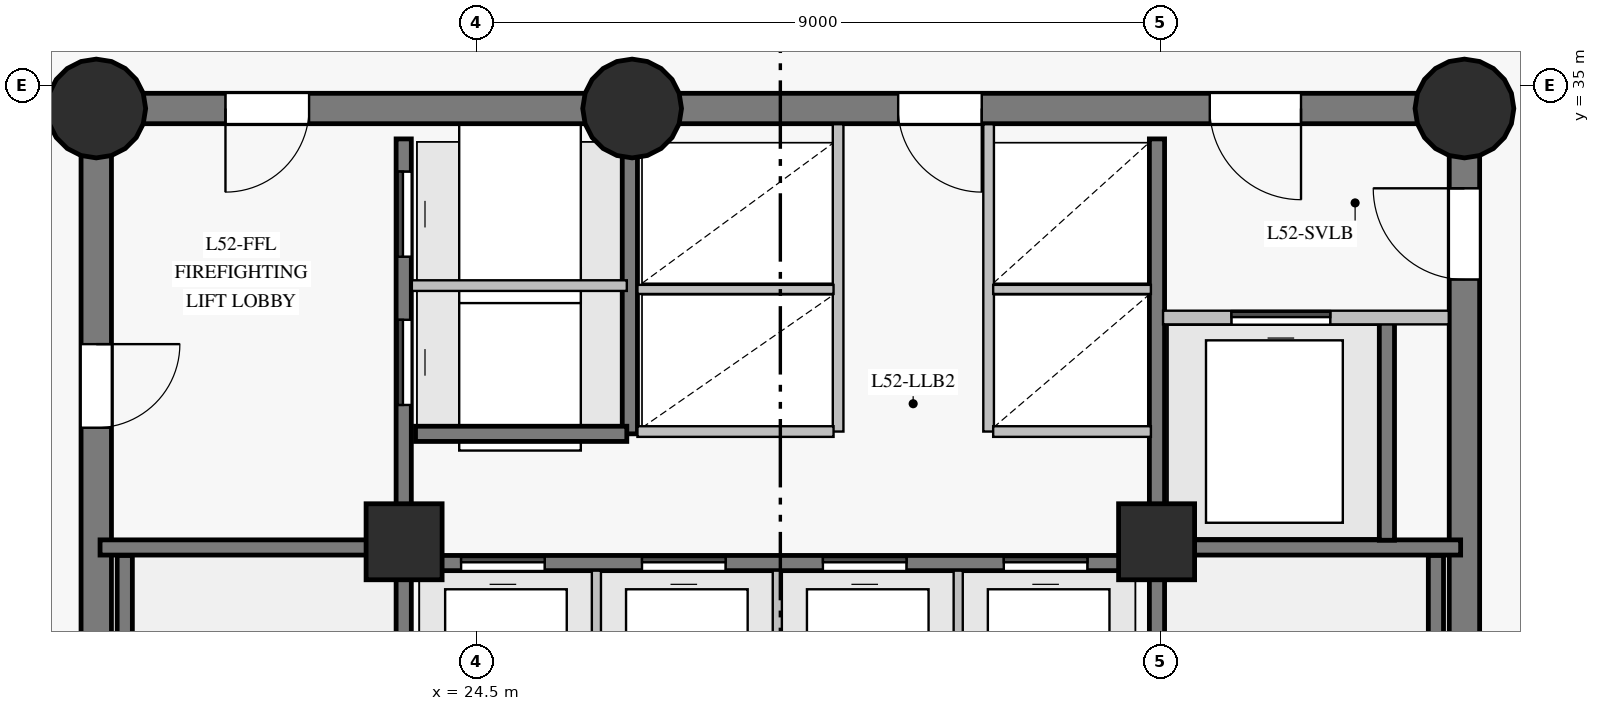
"""IFC4 building model, lengths in metres.
Left out: names, types, materials, properties, quantities, classifications, styles, units other than length and angle.
Written with IfcOpenShell. Run it as: python <this file> out.ifc"""

import sys

from ifc_helpers import new_model, si_unit, direction, frame, frame_2d, origin, origin_with_axes, origin_2d, place, context, subcontext, project, spatial, rectangle, circle, extrude, source, transform, mapped, element, fill, save


model = new_model("IFC4")
c1 = context("Model", 3, precision=1e-05, world=origin(), true_north=direction((0.0, 1.0)))
c2 = subcontext(c1, "Body", "Model", "MODEL_VIEW")
j1 = project(units=[si_unit("LENGTHUNIT", "METRE"), si_unit("PLANEANGLEUNIT", "RADIAN")], contexts=[c1])
p1 = place(None, origin())
s1 = spatial("IfcSite", under=j1, at=p1, CompositionType="ELEMENT")
p2 = place(p1, origin())
s2 = spatial("IfcBuilding", under=s1, at=p2, CompositionType="ELEMENT")
p3 = place(p2, frame((0.0, 0.0, 180.95)))
s3 = spatial("IfcBuildingStorey", under=s2, at=p3, CompositionType="ELEMENT", Elevation=180.95)
p4 = place(p3, frame((37.5, 18.3, 0.0), z_axis=(0.0, 0.0, 1.0), x_axis=(0.0, 1.0, 0.0)))
e1 = element("IfcWall", 1, at=p4, inside=s3, PredefinedType="SHEAR", context=c2, shape_type="SweptSolid", body=[
    extrude(rectangle(XDim=16.4, YDim=0.4, at=frame_2d((8.2, 0.0))), origin(), (0.0, 0.0, 1.0), 2.825),
])
p5 = place(p4, frame((14.15, 0.0, 0.0)))
e2 = element("IfcOpeningElement", 2, at=p5, cuts=e1, PredefinedType="OPENING", context=c2, shape_type="SweptSolid", body=[
    extrude(rectangle(XDim=1.2, YDim=2.15, at=frame_2d((0.6, 1.075))), frame((0.0, 0.21, 0.0), z_axis=(0.0, -1.0, 0.0), x_axis=(1.0, 0.0, 0.0)), (0.0, 0.0, 1.0), 0.42),
])
p6 = place(p3, frame((37.5, 34.7, 0.0), z_axis=(0.0, 0.0, 1.0), x_axis=(-1.0, 0.0, 0.0)))
e3 = element("IfcWall", 3, at=p6, inside=s3, PredefinedType="SHEAR", context=c2, shape_type="SweptSolid", body=[
    extrude(rectangle(XDim=10.95, YDim=0.4, at=frame_2d((5.475, 0.0))), origin(), (0.0, 0.0, 1.0), 2.825),
])
p7 = place(p6, frame((2.15, 0.0, 0.0)))
e4 = element("IfcOpeningElement", 4, at=p7, cuts=e3, PredefinedType="OPENING", context=c2, shape_type="SweptSolid", body=[
    extrude(rectangle(XDim=1.2, YDim=2.15, at=frame_2d((0.6, 1.075))), frame((0.0, 0.21, 0.0), z_axis=(0.0, -1.0, 0.0), x_axis=(1.0, 0.0, 0.0)), (0.0, 0.0, 1.0), 0.42),
])
p8 = place(p6, frame((6.35, 0.0, 0.0)))
e5 = element("IfcOpeningElement", 5, at=p8, cuts=e3, PredefinedType="OPENING", context=c2, shape_type="SweptSolid", body=[
    extrude(rectangle(XDim=1.1, YDim=2.15, at=frame_2d((0.55, 1.075))), frame((0.0, 0.21, 0.0), z_axis=(0.0, -1.0, 0.0), x_axis=(1.0, 0.0, 0.0)), (0.0, 0.0, 1.0), 0.42),
])
p9 = place(p3, frame((26.55, 34.7, 0.0), z_axis=(0.0, 0.0, 1.0), x_axis=(-1.0, 0.0, 0.0)))
e6 = element("IfcWall", 6, at=p9, inside=s3, PredefinedType="SHEAR", context=c2, shape_type="SweptSolid", body=[
    extrude(rectangle(XDim=7.05, YDim=0.4, at=frame_2d((3.525, 0.0))), origin(), (0.0, 0.0, 1.0), 2.825),
])
p10 = place(p9, frame((4.25, 0.0, 0.0)))
e7 = element("IfcOpeningElement", 7, at=p10, cuts=e6, PredefinedType="OPENING", context=c2, shape_type="SweptSolid", body=[
    extrude(rectangle(XDim=1.1, YDim=2.15, at=frame_2d((0.55, 1.075))), frame((0.0, 0.21, 0.0), z_axis=(0.0, -1.0, 0.0), x_axis=(1.0, 0.0, 0.0)), (0.0, 0.0, 1.0), 0.42),
])
p11 = place(p3, frame((19.5, 34.7, 0.0), z_axis=(0.0, 0.0, 1.0), x_axis=(0.0, -1.0, 0.0)))
e8 = element("IfcWall", 8, at=p11, inside=s3, PredefinedType="SHEAR", context=c2, shape_type="SweptSolid", body=[
    extrude(rectangle(XDim=16.4, YDim=0.4, at=frame_2d((8.2, 0.0))), origin(), (0.0, 0.0, 1.0), 2.825),
])
p12 = place(p11, frame((3.1, 0.0, 0.0)))
e9 = element("IfcOpeningElement", 9, at=p12, cuts=e8, PredefinedType="OPENING", context=c2, shape_type="SweptSolid", body=[
    extrude(rectangle(XDim=1.1, YDim=2.15, at=frame_2d((0.55, 1.075))), frame((0.0, 0.21, 0.0), z_axis=(0.0, -1.0, 0.0), x_axis=(1.0, 0.0, 0.0)), (0.0, 0.0, 1.0), 0.42),
])
m1 = source(origin_with_axes(), c2, "Body", "SweptSolid", [
    extrude(circle(Radius=0.65, at=origin_2d()), origin(), (0.0, 0.0, 1.0), 3.05),
])
for number, where, z_axis, x_axis in (
    (10, (19.5, 34.7, 0.0), (0.0, 0.0, 1.0), (1.0, 0.0, 0.0)),
    (11, (26.55, 34.7, 0.0), (0.0, 0.0, 1.0), (1.0, 0.0, 0.0)),
    (12, (37.5, 34.7, 0.0), (0.0, 0.0, 1.0), (1.0, 0.0, 0.0)),
):
    element("IfcColumn", number, at=place(p3, frame(where, z_axis=z_axis, x_axis=x_axis)), inside=s3, PredefinedType="COLUMN", context=c2, shape_type="MappedRepresentation", body=[
        mapped(m1, transform((0.0, 0.0, 0.0), scale=1.0)),
    ])
m2 = source(origin_with_axes(), c2, "Body", "SweptSolid", [
    extrude(rectangle(XDim=1.0, YDim=1.0, at=origin_2d()), origin(), (0.0, 0.0, 1.0), 3.05),
])
for number, where, z_axis, x_axis in (
    (13, (23.55, 29.0, 0.0), (0.0, 0.0, 1.0), (1.0, 0.0, 0.0)),
    (14, (33.45, 29.0, 0.0), (0.0, 0.0, 1.0), (1.0, 0.0, 0.0)),
):
    element("IfcColumn", number, at=place(p3, frame(where, z_axis=z_axis, x_axis=x_axis)), inside=s3, PredefinedType="COLUMN", context=c2, shape_type="MappedRepresentation", body=[
        mapped(m2, transform((0.0, 0.0, 0.0), scale=1.0)),
    ])
p13 = place(p3, frame((23.545, 18.7, 0.0), z_axis=(0.0, 0.0, 1.0), x_axis=(0.0, 1.0, 0.0)))
e15 = element("IfcWall", 15, at=p13, inside=s3, PredefinedType="SHEAR", context=c2, shape_type="SweptSolid", body=[
    extrude(rectangle(XDim=15.6, YDim=0.2, at=frame_2d((7.8, 0.0))), origin(), (0.0, 0.0, 1.0), 2.825),
])
p14 = place(p13, frame((2.75, 0.0, 0.0)))
e16 = element("IfcOpeningElement", 16, at=p14, cuts=e15, PredefinedType="OPENING", context=c2, shape_type="SweptSolid", body=[
    extrude(rectangle(XDim=1.15, YDim=2.15, at=frame_2d((0.575, 1.075))), frame((0.0, 0.11, 0.0), z_axis=(0.0, -1.0, 0.0), x_axis=(1.0, 0.0, 0.0)), (0.0, 0.0, 1.0), 0.22),
])
p15 = place(p13, frame((0.14, 0.0, 0.0)))
e17 = element("IfcOpeningElement", 17, at=p15, cuts=e15, PredefinedType="OPENING", context=c2, shape_type="SweptSolid", body=[
    extrude(rectangle(XDim=0.88, YDim=2.1, at=frame_2d((0.44, 1.05))), frame((0.0, 0.11, 0.0), z_axis=(0.0, -1.0, 0.0), x_axis=(1.0, 0.0, 0.0)), (0.0, 0.0, 1.0), 0.22),
])
p16 = place(p13, frame((1.36, 0.0, 0.0)))
e18 = element("IfcOpeningElement", 18, at=p16, cuts=e15, PredefinedType="OPENING", context=c2, shape_type="SweptSolid", body=[
    extrude(rectangle(XDim=0.88, YDim=2.1, at=frame_2d((0.44, 1.05))), frame((0.0, 0.11, 0.0), z_axis=(0.0, -1.0, 0.0), x_axis=(1.0, 0.0, 0.0)), (0.0, 0.0, 1.0), 0.22),
])
p17 = place(p13, frame((12.1, 0.0, 0.0)))
e19 = element("IfcOpeningElement", 19, at=p17, cuts=e15, PredefinedType="OPENING", context=c2, shape_type="SweptSolid", body=[
    extrude(rectangle(XDim=1.12, YDim=2.15, at=frame_2d((0.56, 1.075))), frame((0.0, 0.11, 0.0), z_axis=(0.0, -1.0, 0.0), x_axis=(1.0, 0.0, 0.0)), (0.0, 0.0, 1.0), 0.22),
])
p18 = place(p13, frame((14.05, 0.0, 0.0)))
e20 = element("IfcOpeningElement", 20, at=p18, cuts=e15, PredefinedType="OPENING", context=c2, shape_type="SweptSolid", body=[
    extrude(rectangle(XDim=1.12, YDim=2.15, at=frame_2d((0.56, 1.075))), frame((0.0, 0.11, 0.0), z_axis=(0.0, -1.0, 0.0), x_axis=(1.0, 0.0, 0.0)), (0.0, 0.0, 1.0), 0.22),
])
p19 = place(p3, frame((33.455, 18.7, 0.0), z_axis=(0.0, 0.0, 1.0), x_axis=(0.0, 1.0, 0.0)))
e21 = element("IfcWall", 21, at=p19, inside=s3, PredefinedType="SHEAR", context=c2, shape_type="SweptSolid", body=[
    extrude(rectangle(XDim=15.6, YDim=0.2, at=frame_2d((7.8, 0.0))), origin(), (0.0, 0.0, 1.0), 2.825),
])
p20 = place(p19, frame((2.75, 0.0, 0.0)))
e22 = element("IfcOpeningElement", 22, at=p20, cuts=e21, PredefinedType="OPENING", context=c2, shape_type="SweptSolid", body=[
    extrude(rectangle(XDim=1.15, YDim=2.15, at=frame_2d((0.575, 1.075))), frame((0.0, 0.11, 0.0), z_axis=(0.0, -1.0, 0.0), x_axis=(1.0, 0.0, 0.0)), (0.0, 0.0, 1.0), 0.22),
])
p21 = place(p19, frame((0.55, 0.0, 0.0)))
e23 = element("IfcOpeningElement", 23, at=p21, cuts=e21, PredefinedType="OPENING", context=c2, shape_type="SweptSolid", body=[
    extrude(rectangle(XDim=0.94, YDim=2.1, at=frame_2d((0.47, 1.05))), frame((0.0, 0.11, 0.0), z_axis=(0.0, -1.0, 0.0), x_axis=(1.0, 0.0, 0.0)), (0.0, 0.0, 1.0), 0.22),
])
p22 = place(p3, frame((23.7, 28.72, 0.0), z_axis=(0.0, 0.0, 1.0), x_axis=(1.0, 0.0, 0.0)))
e24 = element("IfcWall", 24, at=p22, inside=s3, PredefinedType="SHEAR", context=c2, shape_type="SweptSolid", body=[
    extrude(rectangle(XDim=9.6, YDim=0.2, at=frame_2d((4.8, 0.0))), origin(), (0.0, 0.0, 1.0), 2.825),
])
p23 = place(p22, frame((0.6, 0.0, 0.0)))
e25 = element("IfcOpeningElement", 25, at=p23, cuts=e24, PredefinedType="OPENING", context=c2, shape_type="SweptSolid", body=[
    extrude(rectangle(XDim=1.1, YDim=2.15, at=frame_2d((0.55, 1.075))), frame((0.0, 0.11, 0.0), z_axis=(0.0, -1.0, 0.0), x_axis=(1.0, 0.0, 0.0)), (0.0, 0.0, 1.0), 0.22),
])
p24 = place(p22, frame((2.98, 0.0, 0.0)))
e26 = element("IfcOpeningElement", 26, at=p24, cuts=e24, PredefinedType="OPENING", context=c2, shape_type="SweptSolid", body=[
    extrude(rectangle(XDim=1.1, YDim=2.15, at=frame_2d((0.55, 1.075))), frame((0.0, 0.11, 0.0), z_axis=(0.0, -1.0, 0.0), x_axis=(1.0, 0.0, 0.0)), (0.0, 0.0, 1.0), 0.22),
])
p25 = place(p22, frame((5.36, 0.0, 0.0)))
e27 = element("IfcOpeningElement", 27, at=p25, cuts=e24, PredefinedType="OPENING", context=c2, shape_type="SweptSolid", body=[
    extrude(rectangle(XDim=1.1, YDim=2.15, at=frame_2d((0.55, 1.075))), frame((0.0, 0.11, 0.0), z_axis=(0.0, -1.0, 0.0), x_axis=(1.0, 0.0, 0.0)), (0.0, 0.0, 1.0), 0.22),
])
p26 = place(p22, frame((7.74, 0.0, 0.0)))
e28 = element("IfcOpeningElement", 28, at=p26, cuts=e24, PredefinedType="OPENING", context=c2, shape_type="SweptSolid", body=[
    extrude(rectangle(XDim=1.1, YDim=2.15, at=frame_2d((0.55, 1.075))), frame((0.0, 0.11, 0.0), z_axis=(0.0, -1.0, 0.0), x_axis=(1.0, 0.0, 0.0)), (0.0, 0.0, 1.0), 0.22),
])
for number, where, z_axis, x_axis in (
    (29, (19.875, 21.32, 0.0), (0.0, 0.0, 1.0), (0.0, 1.0, 0.0)),
    (30, (37.125, 21.32, 0.0), (0.0, 0.0, 1.0), (0.0, 1.0, 0.0)),
):
    element("IfcWall", number, at=place(p3, frame(where, z_axis=z_axis, x_axis=x_axis)), inside=s3, PredefinedType="SHEAR", context=c2, shape_type="SweptSolid", body=[
        extrude(rectangle(XDim=7.5, YDim=0.2, at=frame_2d((3.75, 0.0))), origin(), (0.0, 0.0, 1.0), 2.825),
    ])
for number, where, z_axis, x_axis in (
    (31, (33.455, 28.925, 0.0), (0.0, 0.0, 1.0), (1.0, 0.0, 0.0)),
    (32, (19.55, 28.925, 0.0), (0.0, 0.0, 1.0), (1.0, 0.0, 0.0)),
):
    element("IfcWall", number, at=place(p3, frame(where, z_axis=z_axis, x_axis=x_axis)), inside=s3, PredefinedType="SHEAR", context=c2, shape_type="SweptSolid", body=[
        extrude(rectangle(XDim=3.995, YDim=0.2, at=frame_2d((1.998, 0.0))), origin(), (0.0, 0.0, 1.0), 2.825),
    ])
p27 = place(p3, frame((26.52, 30.42, 0.0), z_axis=(0.0, 0.0, 1.0), x_axis=(0.0, 1.0, 0.0)))
e33 = element("IfcWall", 33, at=p27, inside=s3, PredefinedType="SHEAR", context=c2, shape_type="SweptSolid", body=[
    extrude(rectangle(XDim=3.86, YDim=0.2, at=frame_2d((1.93, 0.0))), origin(), (0.0, 0.0, 1.0), 2.825),
])
p28 = place(p3, frame((36.48, 29.02, 0.0), z_axis=(0.0, 0.0, 1.0), x_axis=(0.0, 1.0, 0.0)))
e34 = element("IfcWall", 34, at=p28, inside=s3, PredefinedType="SHEAR", context=c2, shape_type="SweptSolid", body=[
    extrude(rectangle(XDim=2.86, YDim=0.2, at=frame_2d((1.43, 0.0))), origin(), (0.0, 0.0, 1.0), 2.825),
])
p29 = place(p3, frame((23.7, 30.42, 0.0), z_axis=(0.0, 0.0, 1.0), x_axis=(1.0, 0.0, 0.0)))
e35 = element("IfcWall", 35, at=p29, inside=s3, PredefinedType="SHEAR", context=c2, shape_type="SweptSolid", body=[
    extrude(rectangle(XDim=2.78, YDim=0.2, at=frame_2d((1.39, 0.0))), origin(), (0.0, 0.0, 1.0), 2.825),
])
for number, where, z_axis, x_axis in (
    (36, (29.26, 30.45, 0.0), (0.0, 0.0, 1.0), (0.0, 1.0, 0.0)),
    (37, (31.24, 30.45, 0.0), (0.0, 0.0, 1.0), (0.0, 1.0, 0.0)),
):
    element("IfcWall", number, at=place(p3, frame(where, z_axis=z_axis, x_axis=x_axis)), inside=s3, PredefinedType="PARTITIONING", context=c2, shape_type="SweptSolid", body=[
        extrude(rectangle(XDim=4.043, YDim=0.14, at=frame_2d((2.021, 0.0))), origin(), (0.0, 0.0, 1.0), 2.825),
    ])
p30 = place(p3, frame((33.535, 31.95, 0.0), z_axis=(0.0, 0.0, 1.0), x_axis=(1.0, 0.0, 0.0)))
e38 = element("IfcWall", 38, at=p30, inside=s3, PredefinedType="PARTITIONING", context=c2, shape_type="SweptSolid", body=[
    extrude(rectangle(XDim=3.759, YDim=0.18, at=frame_2d((1.879, 0.0))), origin(), (0.0, 0.0, 1.0), 2.825),
])
p31 = place(p30, frame((0.9, 0.0, 0.0)))
e39 = element("IfcOpeningElement", 39, at=p31, cuts=e38, PredefinedType="OPENING", context=c2, shape_type="SweptSolid", body=[
    extrude(rectangle(XDim=1.3, YDim=2.2, at=frame_2d((0.65, 1.1))), frame((0.0, 0.1, 0.0), z_axis=(0.0, -1.0, 0.0), x_axis=(1.0, 0.0, 0.0)), (0.0, 0.0, 1.0), 0.2),
])
p32 = place(p3, frame((23.652, 32.37, 0.0), z_axis=(0.0, 0.0, 1.0), x_axis=(1.0, 0.0, 0.0)))
e40 = element("IfcWall", 40, at=p32, inside=s3, PredefinedType="PARTITIONING", context=c2, shape_type="SweptSolid", body=[
    extrude(rectangle(XDim=2.828, YDim=0.14, at=frame_2d((1.414, 0.0))), origin(), (0.0, 0.0, 1.0), 2.825),
])
for number, where, z_axis, x_axis in (
    (41, (26.08, 26.02, 0.0), (0.0, 0.0, 1.0), (0.0, 1.0, 0.0)),
    (42, (28.46, 26.02, 0.0), (0.0, 0.0, 1.0), (0.0, 1.0, 0.0)),
    (43, (30.84, 26.02, 0.0), (0.0, 0.0, 1.0), (0.0, 1.0, 0.0)),
):
    element("IfcWall", number, at=place(p3, frame(where, z_axis=z_axis, x_axis=x_axis)), inside=s3, PredefinedType="PARTITIONING", context=c2, shape_type="SweptSolid", body=[
        extrude(rectangle(XDim=2.6, YDim=0.12, at=frame_2d((1.3, 0.0))), origin(), (0.0, 0.0, 1.0), 2.825),
    ])
p33 = place(p3, frame((26.62, 30.45, 0.0), z_axis=(0.0, 0.0, 1.0), x_axis=(1.0, 0.0, 0.0)))
e44 = element("IfcWall", 44, at=p33, inside=s3, PredefinedType="PARTITIONING", context=c2, shape_type="SweptSolid", body=[
    extrude(rectangle(XDim=2.58, YDim=0.14, at=frame_2d((1.29, 0.0))), origin(), (0.0, 0.0, 1.0), 2.825),
])
p34 = place(p3, frame((26.62, 32.32, 0.0), z_axis=(0.0, 0.0, 1.0), x_axis=(1.0, 0.0, 0.0)))
e45 = element("IfcWall", 45, at=p34, inside=s3, PredefinedType="PARTITIONING", context=c2, shape_type="SweptSolid", body=[
    extrude(rectangle(XDim=2.58, YDim=0.12, at=frame_2d((1.29, 0.0))), origin(), (0.0, 0.0, 1.0), 2.825),
])
p35 = place(p3, frame((31.3, 30.45, 0.0), z_axis=(0.0, 0.0, 1.0), x_axis=(1.0, 0.0, 0.0)))
e46 = element("IfcWall", 46, at=p35, inside=s3, PredefinedType="PARTITIONING", context=c2, shape_type="SweptSolid", body=[
    extrude(rectangle(XDim=2.075, YDim=0.14, at=frame_2d((1.038, 0.0))), origin(), (0.0, 0.0, 1.0), 2.825),
])
p36 = place(p3, frame((31.3, 32.32, 0.0), z_axis=(0.0, 0.0, 1.0), x_axis=(1.0, 0.0, 0.0)))
e47 = element("IfcWall", 47, at=p36, inside=s3, PredefinedType="PARTITIONING", context=c2, shape_type="SweptSolid", body=[
    extrude(rectangle(XDim=2.075, YDim=0.12, at=frame_2d((1.038, 0.0))), origin(), (0.0, 0.0, 1.0), 2.825),
])
m3 = source(origin_with_axes(), c2, "Body", "SweptSolid", [
    extrude(rectangle(XDim=1.1, YDim=2.15, at=frame_2d((0.55, 1.075))), frame((0.0, 0.025, 0.0), z_axis=(0.0, -1.0, 0.0), x_axis=(1.0, 0.0, 0.0)), (0.0, 0.0, 1.0), 0.05),
])
p37 = place(p10, origin())
e48 = element("IfcDoor", 48, at=p37, inside=s3, OperationType="SINGLE_SWING_RIGHT", PredefinedType="DOOR", context=c2, shape_type="MappedRepresentation", body=[
    mapped(m3, transform((0.0, 0.0, 0.0), scale=1.0)),
])
fill(e7, e48)
p38 = place(p12, origin())
e49 = element("IfcDoor", 49, at=p38, inside=s3, OperationType="SINGLE_SWING_LEFT", PredefinedType="DOOR", context=c2, shape_type="MappedRepresentation", body=[
    mapped(m3, transform((0.0, 0.0, 0.0), scale=1.0)),
])
fill(e9, e49)
m4 = source(origin_with_axes(), c2, "Body", "SweptSolid", [
    extrude(rectangle(XDim=1.2, YDim=2.15, at=frame_2d((0.6, 1.075))), frame((0.0, 0.025, 0.0), z_axis=(0.0, -1.0, 0.0), x_axis=(1.0, 0.0, 0.0)), (0.0, 0.0, 1.0), 0.05),
])
p39 = place(p5, origin())
e50 = element("IfcDoor", 50, at=p39, inside=s3, OperationType="SINGLE_SWING_RIGHT", PredefinedType="DOOR", context=c2, shape_type="MappedRepresentation", body=[
    mapped(m4, transform((0.0, 0.0, 0.0), scale=1.0)),
])
fill(e2, e50)
p40 = place(p7, origin())
e51 = element("IfcDoor", 51, at=p40, inside=s3, OperationType="SINGLE_SWING_LEFT", PredefinedType="DOOR", context=c2, shape_type="MappedRepresentation", body=[
    mapped(m4, transform((0.0, 0.0, 0.0), scale=1.0)),
])
fill(e4, e51)
m5 = source(origin_with_axes(), c2, "Body", "SweptSolid", [
    extrude(rectangle(XDim=1.3, YDim=2.2, at=frame_2d((0.65, 1.1))), frame((0.0, 0.025, 0.0), z_axis=(0.0, -1.0, 0.0), x_axis=(1.0, 0.0, 0.0)), (0.0, 0.0, 1.0), 0.05),
])
p41 = place(p31, origin())
e52 = element("IfcDoor", 52, at=p41, inside=s3, OperationType="SLIDING_TO_LEFT", PredefinedType="DOOR", context=c2, shape_type="MappedRepresentation", body=[
    mapped(m5, transform((0.0, 0.0, 0.0), scale=1.0)),
])
fill(e39, e52)
p42 = place(p23, origin())
e53 = element("IfcDoor", 53, at=p42, inside=s3, OperationType="SLIDING_TO_LEFT", PredefinedType="DOOR", context=c2, shape_type="MappedRepresentation", body=[
    mapped(m3, transform((0.0, 0.0, 0.0), scale=1.0)),
])
fill(e25, e53)
p43 = place(p24, origin())
e54 = element("IfcDoor", 54, at=p43, inside=s3, OperationType="SLIDING_TO_RIGHT", PredefinedType="DOOR", context=c2, shape_type="MappedRepresentation", body=[
    mapped(m3, transform((0.0, 0.0, 0.0), scale=1.0)),
])
fill(e26, e54)
p44 = place(p25, origin())
e55 = element("IfcDoor", 55, at=p44, inside=s3, OperationType="SLIDING_TO_LEFT", PredefinedType="DOOR", context=c2, shape_type="MappedRepresentation", body=[
    mapped(m3, transform((0.0, 0.0, 0.0), scale=1.0)),
])
fill(e27, e55)
p45 = place(p26, origin())
e56 = element("IfcDoor", 56, at=p45, inside=s3, OperationType="SLIDING_TO_RIGHT", PredefinedType="DOOR", context=c2, shape_type="MappedRepresentation", body=[
    mapped(m3, transform((0.0, 0.0, 0.0), scale=1.0)),
])
fill(e28, e56)
p46 = place(p8, origin())
e57 = element("IfcDoor", 57, at=p46, inside=s3, OperationType="SINGLE_SWING_LEFT", PredefinedType="DOOR", context=c2, shape_type="MappedRepresentation", body=[
    mapped(m3, transform((0.0, 0.0, 0.0), scale=1.0)),
])
fill(e5, e57)
m6 = source(origin_with_axes(), c2, "Body", "SweptSolid", [
    extrude(rectangle(XDim=1.12, YDim=2.15, at=frame_2d((0.56, 1.075))), frame((0.0, 0.025, 0.0), z_axis=(0.0, -1.0, 0.0), x_axis=(1.0, 0.0, 0.0)), (0.0, 0.0, 1.0), 0.05),
])
p47 = place(p17, origin())
e58 = element("IfcDoor", 58, at=p47, inside=s3, OperationType="SLIDING_TO_LEFT", PredefinedType="DOOR", context=c2, shape_type="MappedRepresentation", body=[
    mapped(m6, transform((0.0, 0.0, 0.0), scale=1.0)),
])
fill(e19, e58)
p48 = place(p18, origin())
e59 = element("IfcDoor", 59, at=p48, inside=s3, OperationType="SLIDING_TO_RIGHT", PredefinedType="DOOR", context=c2, shape_type="MappedRepresentation", body=[
    mapped(m6, transform((0.0, 0.0, 0.0), scale=1.0)),
])
fill(e20, e59)
save(model, sys.argv[1])
